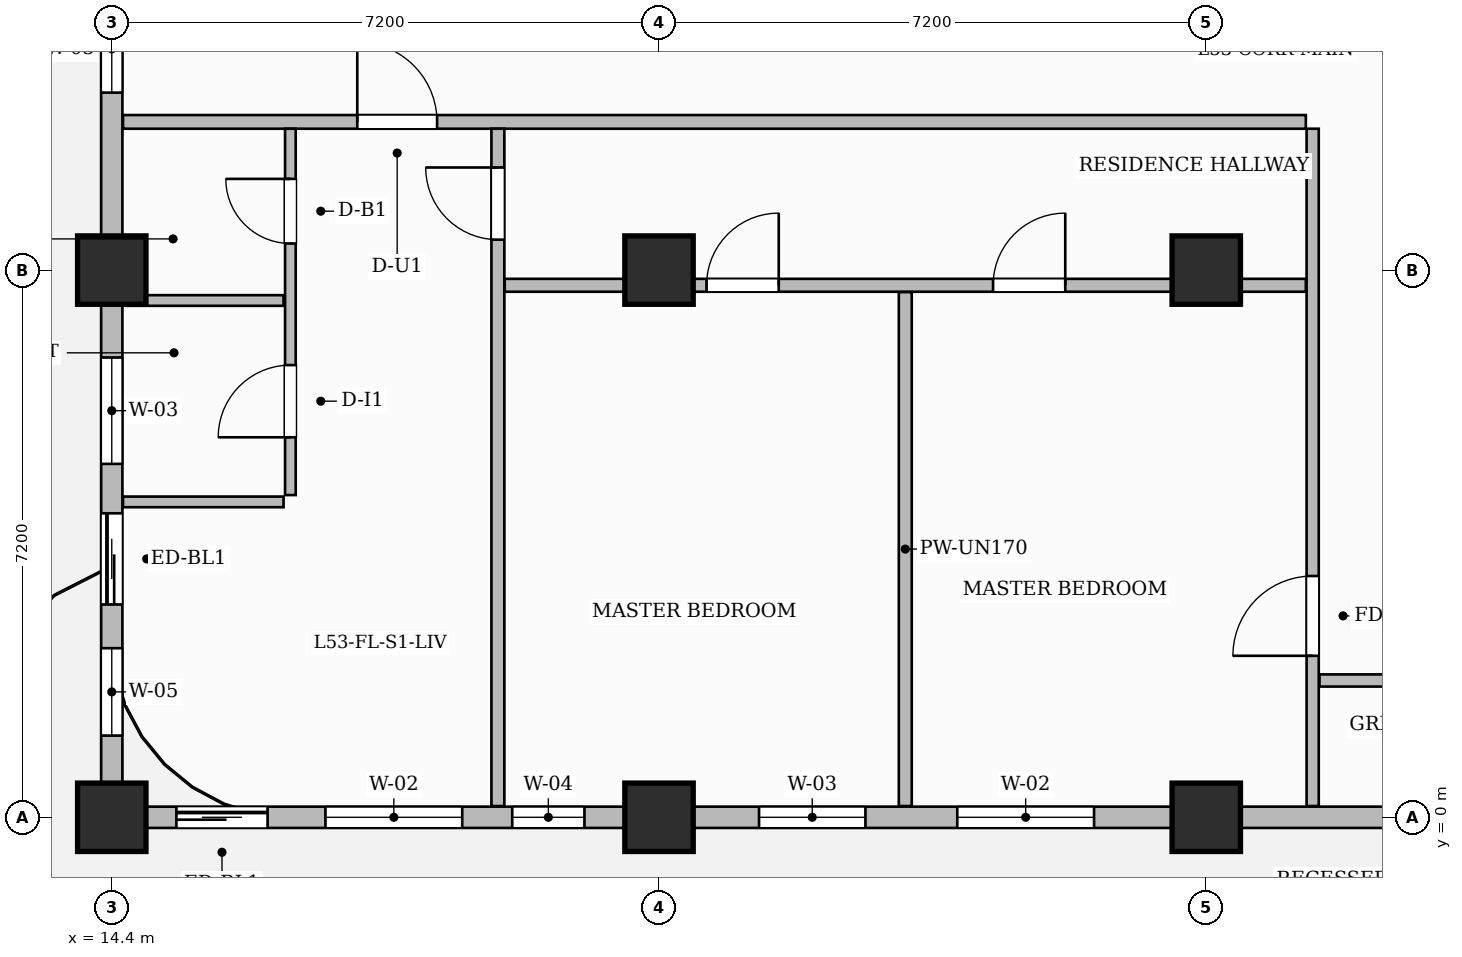
"""IFC4 building model, lengths in metres.
Left out: names, types, materials, properties, quantities, classifications, styles, units other than length and angle.
Written with IfcOpenShell. Run it as: python <this file> out.ifc"""

import sys

from ifc_helpers import new_model, si_unit, direction, frame, frame_2d, origin, origin_2d, place, context, subcontext, project, spatial, rectangle, extrude, source, transform, mapped, element, fill, save


model = new_model("IFC4")
c1 = context("Model", 3, precision=1e-05, world=origin(), true_north=direction((0.0, 1.0)))
c2 = subcontext(c1, "Body", "Model", "MODEL_VIEW")
j1 = project(units=[si_unit("LENGTHUNIT", "METRE"), si_unit("PLANEANGLEUNIT", "RADIAN")], contexts=[c1])
p1 = place(None, origin())
s1 = spatial("IfcSite", under=j1, at=p1, CompositionType="ELEMENT")
p2 = place(p1, origin())
s2 = spatial("IfcBuilding", under=s1, at=p2, CompositionType="ELEMENT")
p3 = place(p2, frame((0.0, 0.0, 213.45)))
s3 = spatial("IfcBuildingStorey", under=s2, at=p3, CompositionType="ELEMENT", Elevation=213.45)
m1 = source(origin(), c2, "Body", "SweptSolid", [
    extrude(rectangle(XDim=0.9, YDim=0.9, at=origin_2d()), origin(), (0.0, 0.0, 1.0), 3.85),
])
for number, where, z_axis, x_axis in (
    (1, (14.4, 0.0, 0.0), (0.0, 0.0, 1.0), (1.0, 0.0, 0.0)),
    (2, (14.4, 7.2, 0.0), (0.0, 0.0, 1.0), (1.0, 0.0, 0.0)),
    (3, (21.6, 0.0, 0.0), (0.0, 0.0, 1.0), (1.0, 0.0, 0.0)),
    (4, (21.6, 7.2, 0.0), (0.0, 0.0, 1.0), (1.0, 0.0, 0.0)),
    (5, (28.8, 0.0, 0.0), (0.0, 0.0, 1.0), (1.0, 0.0, 0.0)),
    (6, (28.8, 7.2, 0.0), (0.0, 0.0, 1.0), (1.0, 0.0, 0.0)),
):
    element("IfcColumn", number, at=place(p3, frame(where, z_axis=z_axis, x_axis=x_axis)), inside=s3, PredefinedType="COLUMN", context=c2, shape_type="MappedRepresentation", body=[
        mapped(m1, transform((0.0, 0.0, 0.0), scale=1.0)),
    ])
p4 = place(p3, frame((14.548, 9.15, 0.0), z_axis=(0.0, 0.0, 1.0), x_axis=(1.0, 0.0, 0.0)))
e7 = element("IfcWall", 7, at=p4, inside=s3, PredefinedType="PARTITIONING", context=c2, shape_type="SweptSolid", body=[
    extrude(rectangle(XDim=15.562, YDim=0.18, at=frame_2d((7.781, 0.0))), origin(), (0.0, 0.0, 1.0), 3.6),
])
p5 = place(p4, frame((3.082, 0.0, 0.0)))
e8 = element("IfcOpeningElement", 8, at=p5, cuts=e7, PredefinedType="OPENING", context=c2, shape_type="SweptSolid", body=[
    extrude(rectangle(XDim=1.05, YDim=2.25, at=frame_2d((0.525, 1.125))), frame((0.0, 0.1, 0.0), z_axis=(0.0, -1.0, 0.0), x_axis=(1.0, 0.0, 0.0)), (0.0, 0.0, 1.0), 0.2),
])
p6 = place(p3, frame((30.2, 0.148, 0.0), z_axis=(0.0, 0.0, 1.0), x_axis=(0.0, 1.0, 0.0)))
e9 = element("IfcWall", 9, at=p6, inside=s3, PredefinedType="PARTITIONING", context=c2, shape_type="SweptSolid", body=[
    extrude(rectangle(XDim=8.912, YDim=0.16, at=frame_2d((4.456, 0.0))), origin(), (0.0, 0.0, 1.0), 3.6),
])
p7 = place(p6, frame((1.977, 0.0, 0.0)))
e10 = element("IfcOpeningElement", 10, at=p7, cuts=e9, PredefinedType="OPENING", context=c2, shape_type="SweptSolid", body=[
    extrude(rectangle(XDim=1.05, YDim=2.15, at=frame_2d((0.525, 1.075))), frame((0.0, 0.09, 0.0), z_axis=(0.0, -1.0, 0.0), x_axis=(1.0, 0.0, 0.0)), (0.0, 0.0, 1.0), 0.18),
])
p8 = place(p3, frame((30.29, 1.8, 0.0), z_axis=(0.0, 0.0, 1.0), x_axis=(1.0, 0.0, 0.0)))
e11 = element("IfcWall", 11, at=p8, inside=s3, PredefinedType="PARTITIONING", context=c2, shape_type="SweptSolid", body=[
    extrude(rectangle(XDim=19.37, YDim=0.16, at=frame_2d((9.685, 0.0))), origin(), (0.0, 0.0, 1.0), 3.6),
])
p9 = place(p8, frame((9.735, 0.0, 0.0)))
e12 = element("IfcOpeningElement", 12, at=p9, cuts=e11, PredefinedType="OPENING", context=c2, shape_type="SweptSolid", body=[
    extrude(rectangle(XDim=0.95, YDim=2.15, at=frame_2d((0.475, 1.075))), frame((0.0, 0.09, 0.0), z_axis=(0.0, -1.0, 0.0), x_axis=(1.0, 0.0, 0.0)), (0.0, 0.0, 1.0), 0.18),
])
p10 = place(p3, frame((16.75, 4.24, 0.0), z_axis=(0.0, 0.0, 1.0), x_axis=(0.0, 1.0, 0.0)))
e13 = element("IfcWall", 13, at=p10, inside=s3, PredefinedType="PARTITIONING", context=c2, shape_type="SweptSolid", body=[
    extrude(rectangle(XDim=4.82, YDim=0.14, at=frame_2d((2.41, 0.0))), origin(), (0.0, 0.0, 1.0), 3.6),
])
p11 = place(p10, frame((0.76, 0.0, 0.0)))
e14 = element("IfcOpeningElement", 14, at=p11, cuts=e13, PredefinedType="OPENING", context=c2, shape_type="SweptSolid", body=[
    extrude(rectangle(XDim=0.95, YDim=2.15, at=frame_2d((0.475, 1.075))), frame((0.0, 0.08, 0.0), z_axis=(0.0, -1.0, 0.0), x_axis=(1.0, 0.0, 0.0)), (0.0, 0.0, 1.0), 0.16),
])
p12 = place(p10, frame((3.31, 0.0, 0.0)))
e15 = element("IfcOpeningElement", 15, at=p12, cuts=e13, PredefinedType="OPENING", context=c2, shape_type="SweptSolid", body=[
    extrude(rectangle(XDim=0.85, YDim=2.1, at=frame_2d((0.425, 1.05))), frame((0.0, 0.08, 0.0), z_axis=(0.0, -1.0, 0.0), x_axis=(1.0, 0.0, 0.0)), (0.0, 0.0, 1.0), 0.16),
])
p13 = place(p3, frame((14.59, 6.8, 0.0), z_axis=(0.0, 0.0, 1.0), x_axis=(1.0, 0.0, 0.0)))
e16 = element("IfcWall", 16, at=p13, inside=s3, PredefinedType="PARTITIONING", context=c2, shape_type="SweptSolid", body=[
    extrude(rectangle(XDim=2.07, YDim=0.14, at=frame_2d((1.035, 0.0))), origin(), (0.0, 0.0, 1.0), 3.6),
])
p14 = place(p3, frame((14.548, 4.15, 0.0), z_axis=(0.0, 0.0, 1.0), x_axis=(1.0, 0.0, 0.0)))
e17 = element("IfcWall", 17, at=p14, inside=s3, PredefinedType="PARTITIONING", context=c2, shape_type="SweptSolid", body=[
    extrude(rectangle(XDim=2.112, YDim=0.14, at=frame_2d((1.056, 0.0))), origin(), (0.0, 0.0, 1.0), 3.6),
])
p15 = place(p3, frame((19.48, 0.148, 0.0), z_axis=(0.0, 0.0, 1.0), x_axis=(0.0, 1.0, 0.0)))
e18 = element("IfcWall", 18, at=p15, inside=s3, PredefinedType="PARTITIONING", context=c2, shape_type="SweptSolid", body=[
    extrude(rectangle(XDim=8.912, YDim=0.17, at=frame_2d((4.456, 0.0))), origin(), (0.0, 0.0, 1.0), 3.6),
])
p16 = place(p15, frame((7.452, 0.0, 0.0)))
e19 = element("IfcOpeningElement", 19, at=p16, cuts=e18, PredefinedType="OPENING", context=c2, shape_type="SweptSolid", body=[
    extrude(rectangle(XDim=0.95, YDim=2.15, at=frame_2d((0.475, 1.075))), frame((0.0, 0.095, 0.0), z_axis=(0.0, -1.0, 0.0), x_axis=(1.0, 0.0, 0.0)), (0.0, 0.0, 1.0), 0.19),
])
p17 = place(p3, frame((19.57, 7.0, 0.0), z_axis=(0.0, 0.0, 1.0), x_axis=(1.0, 0.0, 0.0)))
e20 = element("IfcWall", 20, at=p17, inside=s3, PredefinedType="PARTITIONING", context=c2, shape_type="SweptSolid", body=[
    extrude(rectangle(XDim=10.54, YDim=0.17, at=frame_2d((5.27, 0.0))), origin(), (0.0, 0.0, 1.0), 3.135),
])
p18 = place(p17, frame((2.655, 0.0, 0.0)))
e21 = element("IfcOpeningElement", 21, at=p18, cuts=e20, PredefinedType="OPENING", context=c2, shape_type="SweptSolid", body=[
    extrude(rectangle(XDim=0.95, YDim=2.15, at=frame_2d((0.475, 1.075))), frame((0.0, 0.095, 0.0), z_axis=(0.0, -1.0, 0.0), x_axis=(1.0, 0.0, 0.0)), (0.0, 0.0, 1.0), 0.19),
])
p19 = place(p17, frame((6.425, 0.0, 0.0)))
e22 = element("IfcOpeningElement", 22, at=p19, cuts=e20, PredefinedType="OPENING", context=c2, shape_type="SweptSolid", body=[
    extrude(rectangle(XDim=0.95, YDim=2.15, at=frame_2d((0.475, 1.075))), frame((0.0, 0.095, 0.0), z_axis=(0.0, -1.0, 0.0), x_axis=(1.0, 0.0, 0.0)), (0.0, 0.0, 1.0), 0.19),
])
p20 = place(p3, frame((24.84, 0.148, 0.0), z_axis=(0.0, 0.0, 1.0), x_axis=(0.0, 1.0, 0.0)))
e23 = element("IfcWall", 23, at=p20, inside=s3, PredefinedType="PARTITIONING", context=c2, shape_type="SweptSolid", body=[
    extrude(rectangle(XDim=6.762, YDim=0.17, at=frame_2d((3.381, 0.0))), origin(), (0.0, 0.0, 1.0), 3.6),
])
p21 = place(p3, frame((14.4, 0.0, 0.0), z_axis=(0.0, 0.0, 1.0), x_axis=(1.0, 0.0, 0.0)))
e24 = element("IfcWall", 24, at=p21, inside=s3, PredefinedType="SOLIDWALL", context=c2, shape_type="SweptSolid", body=[
    extrude(rectangle(XDim=35.4, YDim=0.28, at=frame_2d((17.7, 0.0))), origin(), (0.0, 0.0, 1.0), 3.135),
])
p22 = place(p21, frame((0.85, 0.0, 0.0)))
e25 = element("IfcOpeningElement", 25, at=p22, cuts=e24, PredefinedType="OPENING", context=c2, shape_type="SweptSolid", body=[
    extrude(rectangle(XDim=1.2, YDim=2.2, at=frame_2d((0.6, 1.1))), frame((0.0, 0.15, 0.0), z_axis=(0.0, -1.0, 0.0), x_axis=(1.0, 0.0, 0.0)), (0.0, 0.0, 1.0), 0.3),
])
p23 = place(p21, frame((2.811, 0.0, 0.8)))
e26 = element("IfcOpeningElement", 26, at=p23, cuts=e24, PredefinedType="OPENING", context=c2, shape_type="SweptSolid", body=[
    extrude(rectangle(XDim=1.8, YDim=1.85, at=frame_2d((0.9, 0.925))), frame((0.0, 0.15, 0.0), z_axis=(0.0, -1.0, 0.0), x_axis=(1.0, 0.0, 0.0)), (0.0, 0.0, 1.0), 0.3),
])
p24 = place(p21, frame((5.269, 0.0, 0.8)))
e27 = element("IfcOpeningElement", 27, at=p24, cuts=e24, PredefinedType="OPENING", context=c2, shape_type="SweptSolid", body=[
    extrude(rectangle(XDim=0.95, YDim=1.75, at=frame_2d((0.475, 0.875))), frame((0.0, 0.15, 0.0), z_axis=(0.0, -1.0, 0.0), x_axis=(1.0, 0.0, 0.0)), (0.0, 0.0, 1.0), 0.3),
])
p25 = place(p21, frame((8.516, 0.0, 0.8)))
e28 = element("IfcOpeningElement", 28, at=p25, cuts=e24, PredefinedType="OPENING", context=c2, shape_type="SweptSolid", body=[
    extrude(rectangle(XDim=1.4, YDim=1.85, at=frame_2d((0.7, 0.925))), frame((0.0, 0.15, 0.0), z_axis=(0.0, -1.0, 0.0), x_axis=(1.0, 0.0, 0.0)), (0.0, 0.0, 1.0), 0.3),
])
p26 = place(p21, frame((11.124, 0.0, 0.8)))
e29 = element("IfcOpeningElement", 29, at=p26, cuts=e24, PredefinedType="OPENING", context=c2, shape_type="SweptSolid", body=[
    extrude(rectangle(XDim=1.8, YDim=1.85, at=frame_2d((0.9, 0.925))), frame((0.0, 0.15, 0.0), z_axis=(0.0, -1.0, 0.0), x_axis=(1.0, 0.0, 0.0)), (0.0, 0.0, 1.0), 0.3),
])
p27 = place(p21, frame((16.804, 0.0, 0.8)))
e30 = element("IfcOpeningElement", 30, at=p27, cuts=e24, PredefinedType="OPENING", context=c2, shape_type="SweptSolid", body=[
    extrude(rectangle(XDim=1.8, YDim=1.85, at=frame_2d((0.9, 0.925))), frame((0.0, 0.15, 0.0), z_axis=(0.0, -1.0, 0.0), x_axis=(1.0, 0.0, 0.0)), (0.0, 0.0, 1.0), 0.3),
])
p28 = place(p21, frame((21.725, 0.0, 0.8)))
e31 = element("IfcOpeningElement", 31, at=p28, cuts=e24, PredefinedType="OPENING", context=c2, shape_type="SweptSolid", body=[
    extrude(rectangle(XDim=1.8, YDim=1.85, at=frame_2d((0.9, 0.925))), frame((0.0, 0.15, 0.0), z_axis=(0.0, -1.0, 0.0), x_axis=(1.0, 0.0, 0.0)), (0.0, 0.0, 1.0), 0.3),
])
p29 = place(p21, frame((24.475, 0.0, 0.8)))
e32 = element("IfcOpeningElement", 32, at=p29, cuts=e24, PredefinedType="OPENING", context=c2, shape_type="SweptSolid", body=[
    extrude(rectangle(XDim=1.8, YDim=1.85, at=frame_2d((0.9, 0.925))), frame((0.0, 0.15, 0.0), z_axis=(0.0, -1.0, 0.0), x_axis=(1.0, 0.0, 0.0)), (0.0, 0.0, 1.0), 0.3),
])
p30 = place(p21, frame((29.075, 0.0, 0.8)))
e33 = element("IfcOpeningElement", 33, at=p30, cuts=e24, PredefinedType="OPENING", context=c2, shape_type="SweptSolid", body=[
    extrude(rectangle(XDim=1.8, YDim=1.85, at=frame_2d((0.9, 0.925))), frame((0.0, 0.15, 0.0), z_axis=(0.0, -1.0, 0.0), x_axis=(1.0, 0.0, 0.0)), (0.0, 0.0, 1.0), 0.3),
])
p31 = place(p21, frame((32.125, 0.0, 0.8)))
e34 = element("IfcOpeningElement", 34, at=p31, cuts=e24, PredefinedType="OPENING", context=c2, shape_type="SweptSolid", body=[
    extrude(rectangle(XDim=1.8, YDim=1.85, at=frame_2d((0.9, 0.925))), frame((0.0, 0.15, 0.0), z_axis=(0.0, -1.0, 0.0), x_axis=(1.0, 0.0, 0.0)), (0.0, 0.0, 1.0), 0.3),
])
p32 = place(p3, frame((14.4, 0.05, 0.0), z_axis=(0.0, 0.0, 1.0), x_axis=(0.0, 1.0, 0.0)))
e35 = element("IfcWall", 35, at=p32, inside=s3, PredefinedType="SOLIDWALL", context=c2, shape_type="SweptSolid", body=[
    extrude(rectangle(XDim=21.5, YDim=0.28, at=frame_2d((10.75, 0.0))), origin(), (0.0, 0.0, 1.0), 3.135),
])
p33 = place(p32, frame((2.75, 0.0, 0.0)))
e36 = element("IfcOpeningElement", 36, at=p33, cuts=e35, PredefinedType="OPENING", context=c2, shape_type="SweptSolid", body=[
    extrude(rectangle(XDim=1.2, YDim=2.2, at=frame_2d((0.6, 1.1))), frame((0.0, 0.15, 0.0), z_axis=(0.0, -1.0, 0.0), x_axis=(1.0, 0.0, 0.0)), (0.0, 0.0, 1.0), 0.3),
])
p34 = place(p32, frame((1.025, 0.0, 0.8)))
e37 = element("IfcOpeningElement", 37, at=p34, cuts=e35, PredefinedType="OPENING", context=c2, shape_type="SweptSolid", body=[
    extrude(rectangle(XDim=1.15, YDim=1.8, at=frame_2d((0.575, 0.9))), frame((0.0, 0.15, 0.0), z_axis=(0.0, -1.0, 0.0), x_axis=(1.0, 0.0, 0.0)), (0.0, 0.0, 1.0), 0.3),
])
p35 = place(p32, frame((4.6, 0.0, 0.8)))
e38 = element("IfcOpeningElement", 38, at=p35, cuts=e35, PredefinedType="OPENING", context=c2, shape_type="SweptSolid", body=[
    extrude(rectangle(XDim=1.4, YDim=1.85, at=frame_2d((0.7, 0.925))), frame((0.0, 0.15, 0.0), z_axis=(0.0, -1.0, 0.0), x_axis=(1.0, 0.0, 0.0)), (0.0, 0.0, 1.0), 0.3),
])
p36 = place(p32, frame((9.485, 0.0, 0.8)))
e39 = element("IfcOpeningElement", 39, at=p36, cuts=e35, PredefinedType="OPENING", context=c2, shape_type="SweptSolid", body=[
    extrude(rectangle(XDim=1.15, YDim=1.8, at=frame_2d((0.575, 0.9))), frame((0.0, 0.15, 0.0), z_axis=(0.0, -1.0, 0.0), x_axis=(1.0, 0.0, 0.0)), (0.0, 0.0, 1.0), 0.3),
])
p37 = place(p32, frame((11.389, 0.0, 0.8)))
e40 = element("IfcOpeningElement", 40, at=p37, cuts=e35, PredefinedType="OPENING", context=c2, shape_type="SweptSolid", body=[
    extrude(rectangle(XDim=1.8, YDim=1.85, at=frame_2d((0.9, 0.925))), frame((0.0, 0.15, 0.0), z_axis=(0.0, -1.0, 0.0), x_axis=(1.0, 0.0, 0.0)), (0.0, 0.0, 1.0), 0.3),
])
p38 = place(p32, frame((15.675, 0.0, 0.8)))
e41 = element("IfcOpeningElement", 41, at=p38, cuts=e35, PredefinedType="OPENING", context=c2, shape_type="SweptSolid", body=[
    extrude(rectangle(XDim=1.8, YDim=1.85, at=frame_2d((0.9, 0.925))), frame((0.0, 0.15, 0.0), z_axis=(0.0, -1.0, 0.0), x_axis=(1.0, 0.0, 0.0)), (0.0, 0.0, 1.0), 0.3),
])
p39 = place(p32, frame((18.425, 0.0, 0.8)))
e42 = element("IfcOpeningElement", 42, at=p39, cuts=e35, PredefinedType="OPENING", context=c2, shape_type="SweptSolid", body=[
    extrude(rectangle(XDim=1.8, YDim=1.85, at=frame_2d((0.9, 0.925))), frame((0.0, 0.15, 0.0), z_axis=(0.0, -1.0, 0.0), x_axis=(1.0, 0.0, 0.0)), (0.0, 0.0, 1.0), 0.3),
])
m2 = source(origin(), c2, "Body", "SweptSolid", [
    extrude(rectangle(XDim=1.05, YDim=2.15, at=frame_2d((0.525, 1.075))), frame((0.0, 0.025, 0.0), z_axis=(0.0, -1.0, 0.0), x_axis=(1.0, 0.0, 0.0)), (0.0, 0.0, 1.0), 0.05),
])
p40 = place(p7, origin())
e43 = element("IfcDoor", 43, at=p40, inside=s3, OperationType="SINGLE_SWING_LEFT", PredefinedType="DOOR", context=c2, shape_type="MappedRepresentation", body=[
    mapped(m2, transform((0.0, 0.0, 0.0), scale=1.0)),
])
fill(e10, e43)
m3 = source(origin(), c2, "Body", "SweptSolid", [
    extrude(rectangle(XDim=0.95, YDim=2.15, at=frame_2d((0.475, 1.075))), frame((0.0, 0.025, 0.0), z_axis=(0.0, -1.0, 0.0), x_axis=(1.0, 0.0, 0.0)), (0.0, 0.0, 1.0), 0.05),
])
p41 = place(p11, origin())
e44 = element("IfcDoor", 44, at=p41, inside=s3, OperationType="SINGLE_SWING_LEFT", PredefinedType="DOOR", context=c2, shape_type="MappedRepresentation", body=[
    mapped(m3, transform((0.0, 0.0, 0.0), scale=1.0)),
])
fill(e14, e44)
m4 = source(origin(), c2, "Body", "SweptSolid", [
    extrude(rectangle(XDim=0.85, YDim=2.1, at=frame_2d((0.425, 1.05))), frame((0.0, 0.025, 0.0), z_axis=(0.0, -1.0, 0.0), x_axis=(1.0, 0.0, 0.0)), (0.0, 0.0, 1.0), 0.05),
])
p42 = place(p12, origin())
e45 = element("IfcDoor", 45, at=p42, inside=s3, OperationType="SINGLE_SWING_RIGHT", PredefinedType="DOOR", context=c2, shape_type="MappedRepresentation", body=[
    mapped(m4, transform((0.0, 0.0, 0.0), scale=1.0)),
])
fill(e15, e45)
m5 = source(origin(), c2, "Body", "SweptSolid", [
    extrude(rectangle(XDim=1.05, YDim=2.25, at=frame_2d((0.525, 1.125))), frame((0.0, 0.025, 0.0), z_axis=(0.0, -1.0, 0.0), x_axis=(1.0, 0.0, 0.0)), (0.0, 0.0, 1.0), 0.05),
])
p43 = place(p5, origin())
e46 = element("IfcDoor", 46, at=p43, inside=s3, OperationType="SINGLE_SWING_LEFT", PredefinedType="DOOR", context=c2, shape_type="MappedRepresentation", body=[
    mapped(m5, transform((0.0, 0.0, 0.0), scale=1.0)),
])
fill(e8, e46)
p44 = place(p16, origin())
e47 = element("IfcDoor", 47, at=p44, inside=s3, OperationType="SINGLE_SWING_RIGHT", PredefinedType="DOOR", context=c2, shape_type="MappedRepresentation", body=[
    mapped(m3, transform((0.0, 0.0, 0.0), scale=1.0)),
])
fill(e19, e47)
p45 = place(p18, origin())
e48 = element("IfcDoor", 48, at=p45, inside=s3, OperationType="SINGLE_SWING_RIGHT", PredefinedType="DOOR", context=c2, shape_type="MappedRepresentation", body=[
    mapped(m3, transform((0.0, 0.0, 0.0), scale=1.0)),
])
fill(e21, e48)
p46 = place(p19, origin())
e49 = element("IfcDoor", 49, at=p46, inside=s3, OperationType="SINGLE_SWING_RIGHT", PredefinedType="DOOR", context=c2, shape_type="MappedRepresentation", body=[
    mapped(m3, transform((0.0, 0.0, 0.0), scale=1.0)),
])
fill(e22, e49)
m6 = source(origin(), c2, "Body", "SweptSolid", [
    extrude(rectangle(XDim=1.2, YDim=2.2, at=frame_2d((0.6, 1.1))), frame((0.0, 0.025, 0.0), z_axis=(0.0, -1.0, 0.0), x_axis=(1.0, 0.0, 0.0)), (0.0, 0.0, 1.0), 0.05),
])
p47 = place(p22, origin())
e50 = element("IfcDoor", 50, at=p47, inside=s3, OperationType="SLIDING_TO_LEFT", PredefinedType="DOOR", context=c2, shape_type="MappedRepresentation", body=[
    mapped(m6, transform((0.0, 0.0, 0.0), scale=1.0)),
])
fill(e25, e50)
p48 = place(p33, origin())
e51 = element("IfcDoor", 51, at=p48, inside=s3, OperationType="SLIDING_TO_LEFT", PredefinedType="DOOR", context=c2, shape_type="MappedRepresentation", body=[
    mapped(m6, transform((0.0, 0.0, 0.0), scale=1.0)),
])
fill(e36, e51)
m7 = source(origin(), c2, "Body", "SweptSolid", [
    extrude(rectangle(XDim=1.8, YDim=1.85, at=frame_2d((0.9, 0.925))), frame((0.0, 0.03, 0.0), z_axis=(0.0, -1.0, 0.0), x_axis=(1.0, 0.0, 0.0)), (0.0, 0.0, 1.0), 0.06),
])
p49 = place(p23, origin())
e52 = element("IfcWindow", 52, at=p49, inside=s3, PartitioningType="DOUBLE_PANEL_VERTICAL", PredefinedType="WINDOW", context=c2, shape_type="MappedRepresentation", body=[
    mapped(m7, transform((0.0, 0.0, 0.0), scale=1.0)),
])
fill(e26, e52)
m8 = source(origin(), c2, "Body", "SweptSolid", [
    extrude(rectangle(XDim=0.95, YDim=1.75, at=frame_2d((0.475, 0.875))), frame((0.0, 0.03, 0.0), z_axis=(0.0, -1.0, 0.0), x_axis=(1.0, 0.0, 0.0)), (0.0, 0.0, 1.0), 0.06),
])
p50 = place(p24, origin())
e53 = element("IfcWindow", 53, at=p50, inside=s3, PartitioningType="SINGLE_PANEL", PredefinedType="WINDOW", context=c2, shape_type="MappedRepresentation", body=[
    mapped(m8, transform((0.0, 0.0, 0.0), scale=1.0)),
])
fill(e27, e53)
m9 = source(origin(), c2, "Body", "SweptSolid", [
    extrude(rectangle(XDim=1.4, YDim=1.85, at=frame_2d((0.7, 0.925))), frame((0.0, 0.03, 0.0), z_axis=(0.0, -1.0, 0.0), x_axis=(1.0, 0.0, 0.0)), (0.0, 0.0, 1.0), 0.06),
])
p51 = place(p25, origin())
e54 = element("IfcWindow", 54, at=p51, inside=s3, PartitioningType="SINGLE_PANEL", PredefinedType="WINDOW", context=c2, shape_type="MappedRepresentation", body=[
    mapped(m9, transform((0.0, 0.0, 0.0), scale=1.0)),
])
fill(e28, e54)
p52 = place(p26, origin())
e55 = element("IfcWindow", 55, at=p52, inside=s3, PartitioningType="DOUBLE_PANEL_VERTICAL", PredefinedType="WINDOW", context=c2, shape_type="MappedRepresentation", body=[
    mapped(m7, transform((0.0, 0.0, 0.0), scale=1.0)),
])
fill(e29, e55)
m10 = source(origin(), c2, "Body", "SweptSolid", [
    extrude(rectangle(XDim=1.15, YDim=1.8, at=frame_2d((0.575, 0.9))), frame((0.0, 0.03, 0.0), z_axis=(0.0, -1.0, 0.0), x_axis=(1.0, 0.0, 0.0)), (0.0, 0.0, 1.0), 0.06),
])
p53 = place(p34, origin())
e56 = element("IfcWindow", 56, at=p53, inside=s3, PartitioningType="SINGLE_PANEL", PredefinedType="WINDOW", context=c2, shape_type="MappedRepresentation", body=[
    mapped(m10, transform((0.0, 0.0, 0.0), scale=1.0)),
])
fill(e37, e56)
p54 = place(p35, origin())
e57 = element("IfcWindow", 57, at=p54, inside=s3, PartitioningType="SINGLE_PANEL", PredefinedType="WINDOW", context=c2, shape_type="MappedRepresentation", body=[
    mapped(m9, transform((0.0, 0.0, 0.0), scale=1.0)),
])
fill(e38, e57)
p55 = place(p36, origin())
e58 = element("IfcWindow", 58, at=p55, inside=s3, PartitioningType="SINGLE_PANEL", PredefinedType="WINDOW", context=c2, shape_type="MappedRepresentation", body=[
    mapped(m10, transform((0.0, 0.0, 0.0), scale=1.0)),
])
fill(e39, e58)
save(model, sys.argv[1])
